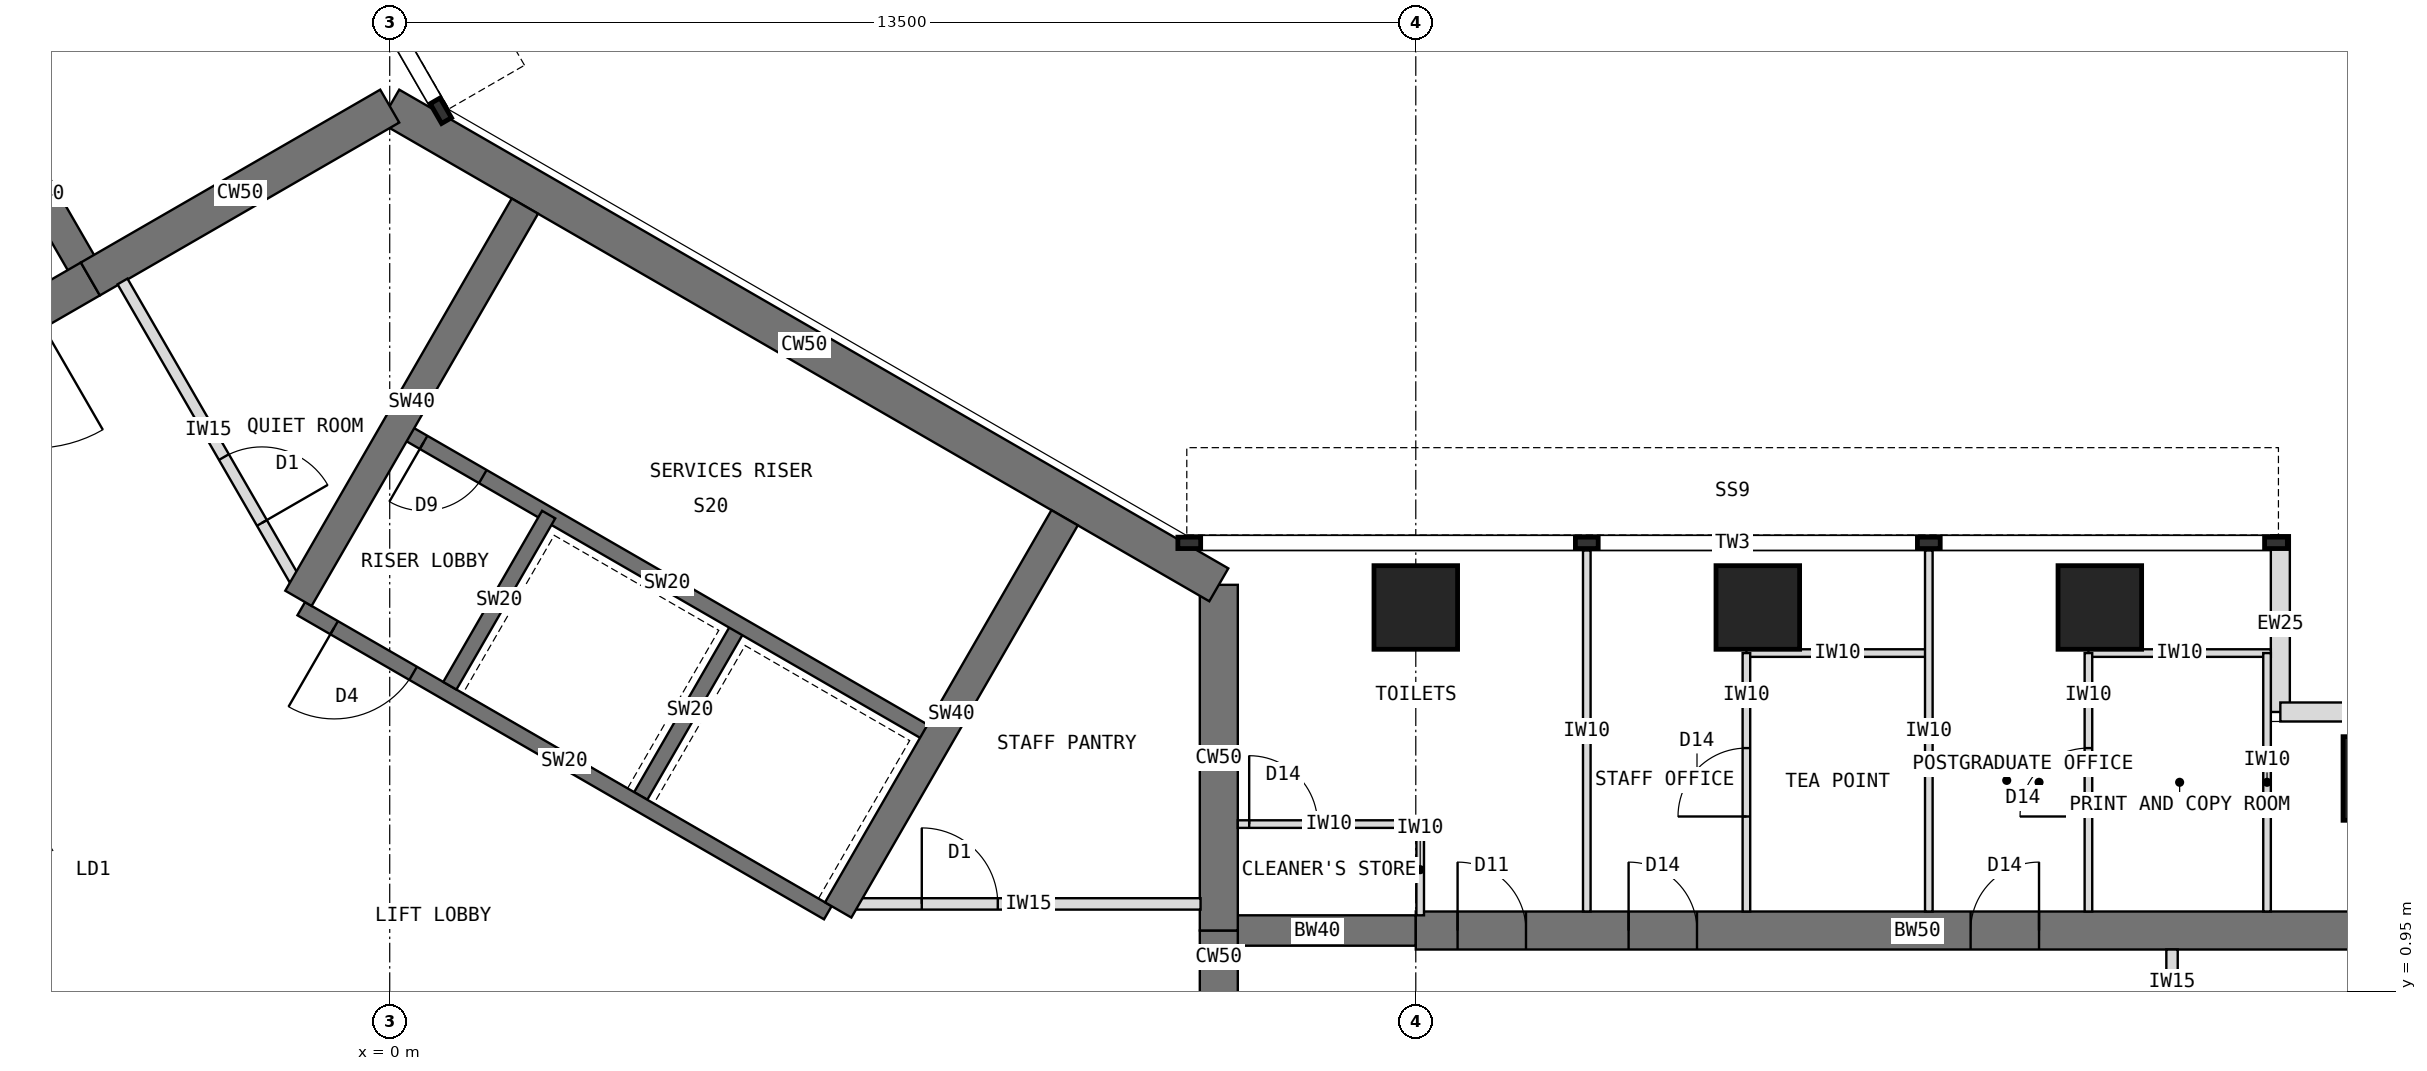
"""IFC4 building model, lengths in metres.
Left out: names, types, materials, properties, quantities, classifications, styles, units other than length and angle.
Written with IfcOpenShell. Run it as: python <this file> out.ifc"""

import sys

from ifc_helpers import new_model, si_unit, direction, frame, frame_2d, origin, origin_2d, place, context, subcontext, project, spatial, rectangle, extrude, element, fill, save


model = new_model("IFC4")
c1 = context("Model", 3, precision=1e-05, world=origin(), true_north=direction((0.0, 1.0)))
c2 = subcontext(c1, "Body", "Model", "MODEL_VIEW")
j1 = project(units=[si_unit("LENGTHUNIT", "METRE"), si_unit("PLANEANGLEUNIT", "RADIAN")], contexts=[c1])
p1 = place(None, origin())
s1 = spatial("IfcSite", under=j1, at=p1, CompositionType="ELEMENT")
p2 = place(p1, origin())
s2 = spatial("IfcBuilding", under=s1, at=p2, CompositionType="ELEMENT")
p3 = place(p2, frame((0.0, 0.0, 234.5)))
s3 = spatial("IfcBuildingStorey", under=s2, at=p3, CompositionType="ELEMENT", Elevation=234.5)
p4 = place(p3, frame((10.908, -1.75, 0.0), z_axis=(0.0, 0.0, 1.0), x_axis=(0.0, 1.0, 0.0)))
e1 = element("IfcWall", 1, at=p4, inside=s3, PredefinedType="SHEAR", context=c2, shape_type="SweptSolid", body=[
    extrude(rectangle(XDim=3.5, YDim=0.5, at=frame_2d((1.75, 0.0))), origin(), (0.0, 0.0, 1.0), 4.0),
])
p5 = place(p4, frame((0.85, 0.0, 0.0)))
e2 = element("IfcOpeningElement", 2, at=p5, cuts=e1, PredefinedType="OPENING", context=c2, shape_type="SweptSolid", body=[
    extrude(rectangle(XDim=1.8, YDim=2.1, at=frame_2d((0.9, 1.05))), frame((0.0, 0.26, 0.0), z_axis=(0.0, -1.0, 0.0), x_axis=(1.0, 0.0, 0.0)), (0.0, 0.0, 1.0), 0.52),
])
p6 = place(p3, frame((10.908, 1.75, 0.0), z_axis=(0.0, 0.0, 1.0), x_axis=(0.0, 1.0, 0.0)))
e3 = element("IfcWall", 3, at=p6, inside=s3, PredefinedType="SHEAR", context=c2, shape_type="SweptSolid", body=[
    extrude(rectangle(XDim=4.548, YDim=0.5, at=frame_2d((2.274, 0.0))), origin(), (0.0, 0.0, 1.0), 4.0),
])
p7 = place(p3, frame((10.908, 6.298, 0.0), z_axis=(0.0, 0.0, 1.0), x_axis=(-0.866021940709, 0.500005998175, 0.0)))
e4 = element("IfcWall", 4, at=p7, inside=s3, PredefinedType="SHEAR", context=c2, shape_type="SweptSolid", body=[
    extrude(rectangle(XDim=12.596, YDim=0.5, at=frame_2d((6.298, 0.0))), origin(), (0.0, 0.0, 1.0), 4.0),
])
p8 = place(p3, frame((0.0, 12.596, 0.0), z_axis=(0.0, 0.0, 1.0), x_axis=(-0.866011268655, -0.500024481964, 0.0)))
e5 = element("IfcWall", 5, at=p8, inside=s3, PredefinedType="SHEAR", context=c2, shape_type="SweptSolid", body=[
    extrude(rectangle(XDim=4.548, YDim=0.5, at=frame_2d((2.274, 0.0))), origin(), (0.0, 0.0, 1.0), 4.0),
])
p9 = place(p3, frame((-3.939, 10.322, 0.0), z_axis=(0.0, 0.0, 1.0), x_axis=(-0.866019471182, -0.500010275428, 0.0)))
e6 = element("IfcWall", 6, at=p9, inside=s3, PredefinedType="SHEAR", context=c2, shape_type="SweptSolid", body=[
    extrude(rectangle(XDim=3.5, YDim=0.5, at=frame_2d((1.75, 0.0))), origin(), (0.0, 0.0, 1.0), 4.0),
])
p10 = place(p9, frame((0.85, 0.0, 0.0)))
e7 = element("IfcOpeningElement", 7, at=p10, cuts=e6, PredefinedType="OPENING", context=c2, shape_type="SweptSolid", body=[
    extrude(rectangle(XDim=1.8, YDim=2.1, at=frame_2d((0.9, 1.05))), frame((0.0, 0.26, 0.0), z_axis=(0.0, -1.0, 0.0), x_axis=(1.0, 0.0, 0.0)), (0.0, 0.0, 1.0), 0.52),
])
p11 = place(p3, frame((10.908, 1.75, 0.0), z_axis=(0.0, 0.0, 1.0), x_axis=(1.0, 0.0, 0.0)))
e8 = element("IfcWall", 8, at=p11, inside=s3, PredefinedType="SHEAR", context=c2, shape_type="SweptSolid", body=[
    extrude(rectangle(XDim=2.592, YDim=0.4, at=frame_2d((1.296, 0.0))), origin(), (0.0, 0.0, 1.0), 4.0),
])
p12 = place(p3, frame((13.5, 1.75, 0.0), z_axis=(0.0, 0.0, 1.0), x_axis=(1.0, 0.0, 0.0)))
e9 = element("IfcWall", 9, at=p12, inside=s3, PredefinedType="SHEAR", context=c2, shape_type="SweptSolid", body=[
    extrude(rectangle(XDim=13.2, YDim=0.5, at=frame_2d((6.6, 0.0))), origin(), (0.0, 0.0, 1.0), 4.0),
])
p13 = place(p12, frame((0.55, 0.0, 0.0)))
e10 = element("IfcOpeningElement", 10, at=p13, cuts=e9, PredefinedType="OPENING", context=c2, shape_type="SweptSolid", body=[
    extrude(rectangle(XDim=0.9, YDim=2.1, at=frame_2d((0.45, 1.05))), frame((0.0, 0.26, 0.0), z_axis=(0.0, -1.0, 0.0), x_axis=(1.0, 0.0, 0.0)), (0.0, 0.0, 1.0), 0.52),
])
p14 = place(p12, frame((2.8, 0.0, 0.0)))
e11 = element("IfcOpeningElement", 11, at=p14, cuts=e9, PredefinedType="OPENING", context=c2, shape_type="SweptSolid", body=[
    extrude(rectangle(XDim=0.9, YDim=2.1, at=frame_2d((0.45, 1.05))), frame((0.0, 0.26, 0.0), z_axis=(0.0, -1.0, 0.0), x_axis=(1.0, 0.0, 0.0)), (0.0, 0.0, 1.0), 0.52),
])
p15 = place(p12, frame((7.3, 0.0, 0.0)))
e12 = element("IfcOpeningElement", 12, at=p15, cuts=e9, PredefinedType="OPENING", context=c2, shape_type="SweptSolid", body=[
    extrude(rectangle(XDim=0.9, YDim=2.1, at=frame_2d((0.45, 1.05))), frame((0.0, 0.26, 0.0), z_axis=(0.0, -1.0, 0.0), x_axis=(1.0, 0.0, 0.0)), (0.0, 0.0, 1.0), 0.52),
])
p16 = place(p3, frame((-3.939, 10.322, 0.0), z_axis=(0.0, 0.0, 1.0), x_axis=(-0.499918158782, 0.866072649678, 0.0)))
e13 = element("IfcWall", 13, at=p16, inside=s3, PredefinedType="SHEAR", context=c2, shape_type="SweptSolid", body=[
    extrude(rectangle(XDim=2.592, YDim=0.4, at=frame_2d((1.296, 0.0))), origin(), (0.0, 0.0, 1.0), 4.0),
])
for number, where, z_axis, x_axis in (
    (14, (13.5, 6.0, 0.0), (0.0, 0.0, 1.0), (1.0, 0.0, 0.0)),
    (15, (18.0, 6.0, 0.0), (0.0, 0.0, 1.0), (1.0, 0.0, 0.0)),
    (16, (22.5, 6.0, 0.0), (0.0, 0.0, 1.0), (1.0, 0.0, 0.0)),
    (17, (26.25, 3.75, 0.0), (0.0, 0.0, 1.0), (1.0, 0.0, 0.0)),
):
    element("IfcColumn", number, at=place(p3, frame(where, z_axis=z_axis, x_axis=x_axis)), inside=s3, PredefinedType="COLUMN", context=c2, shape_type="SweptSolid", body=[
        extrude(rectangle(XDim=1.1, YDim=1.1, at=origin_2d()), origin(), (0.0, 0.0, 1.0), 4.0),
    ])
for number, where, z_axis, x_axis in (
    (18, (24.875, 6.95, 0.0), (0.0, 0.0, 1.0), (0.0, -1.0, 0.0)),
    (19, (24.875, 4.625, 0.0), (0.0, 0.0, 1.0), (1.0, 0.0, 0.0)),
):
    element("IfcWall", number, at=place(p3, frame(where, z_axis=z_axis, x_axis=x_axis)), inside=s3, PredefinedType="STANDARD", context=c2, shape_type="SweptSolid", body=[
        extrude(rectangle(XDim=2.325, YDim=0.25, at=frame_2d((1.163, 0.0))), origin(), (0.0, 0.0, 1.0), 3.7),
    ])
p17 = place(p3, frame((5.764, 1.984, 0.0), z_axis=(0.0, 0.0, 1.0), x_axis=(-0.866026010844, 0.49999894854, 0.0)))
e20 = element("IfcWall", 20, at=p17, inside=s3, PredefinedType="SHEAR", context=c2, shape_type="SweptSolid", body=[
    extrude(rectangle(XDim=8.0, YDim=0.2, at=frame_2d((4.0, 0.0))), origin(), (0.0, 0.0, 1.0), 4.0),
])
p18 = place(p17, frame((6.3, 0.0, 0.0)))
e21 = element("IfcOpeningElement", 21, at=p18, cuts=e20, PredefinedType="OPENING", context=c2, shape_type="SweptSolid", body=[
    extrude(rectangle(XDim=1.2, YDim=2.1, at=frame_2d((0.6, 1.05))), frame((0.0, 0.11, 0.0), z_axis=(0.0, -1.0, 0.0), x_axis=(1.0, 0.0, 0.0)), (0.0, 0.0, 1.0), 0.22),
])
for number, where, z_axis, x_axis in (
    (22, (3.303, 3.52, 0.0), (0.0, 0.0, 1.0), (0.5, 0.866, 0.0)),
    (23, (0.791, 4.97, 0.0), (0.0, 0.0, 1.0), (0.5, 0.866, 0.0)),
):
    element("IfcWall", number, at=place(p3, frame(where, z_axis=z_axis, x_axis=x_axis)), inside=s3, PredefinedType="SHEAR", context=c2, shape_type="SweptSolid", body=[
        extrude(rectangle(XDim=2.6, YDim=0.2, at=frame_2d((1.3, 0.0))), origin(), (0.0, 0.0, 1.0), 4.0),
    ])
p19 = place(p3, frame((7.114, 4.322, 0.0), z_axis=(0.0, 0.0, 1.0), x_axis=(-0.866026010844, 0.49999894854, 0.0)))
e24 = element("IfcWall", 24, at=p19, inside=s3, PredefinedType="SHEAR", context=c2, shape_type="SweptSolid", body=[
    extrude(rectangle(XDim=8.0, YDim=0.2, at=frame_2d((4.0, 0.0))), origin(), (0.0, 0.0, 1.0), 4.0),
])
p20 = place(p19, frame((6.8, 0.0, 0.0)))
e25 = element("IfcOpeningElement", 25, at=p20, cuts=e24, PredefinedType="OPENING", context=c2, shape_type="SweptSolid", body=[
    extrude(rectangle(XDim=0.9, YDim=2.1, at=frame_2d((0.45, 1.05))), frame((0.0, 0.11, 0.0), z_axis=(0.0, -1.0, 0.0), x_axis=(1.0, 0.0, 0.0)), (0.0, 0.0, 1.0), 0.22),
])
p21 = place(p3, frame((-1.201, 6.12, 0.0), z_axis=(0.0, 0.0, 1.0), x_axis=(0.500021575205, 0.866012946976, 0.0)))
e26 = element("IfcWall", 26, at=p21, inside=s3, PredefinedType="SHEAR", context=c2, shape_type="SweptSolid", body=[
    extrude(rectangle(XDim=5.958, YDim=0.4, at=frame_2d((2.979, 0.0))), origin(), (0.0, 0.0, 1.0), 4.0),
])
p22 = place(p3, frame((5.901, 2.02, 0.0), z_axis=(0.0, 0.0, 1.0), x_axis=(0.500003832394, 0.86602319114, 0.0)))
e27 = element("IfcWall", 27, at=p22, inside=s3, PredefinedType="SHEAR", context=c2, shape_type="SweptSolid", body=[
    extrude(rectangle(XDim=5.958, YDim=0.4, at=frame_2d((2.979, 0.0))), origin(), (0.0, 0.0, 1.0), 4.0),
])
for number, where, z_axis, x_axis in (
    (28, (15.75, 2.0, 0.0), (0.0, 0.0, 1.0), (0.0, 1.0, 0.0)),
    (29, (20.25, 2.0, 0.0), (0.0, 0.0, 1.0), (0.0, 1.0, 0.0)),
):
    element("IfcWall", number, at=place(p3, frame(where, z_axis=z_axis, x_axis=x_axis)), inside=s3, PredefinedType="PARTITIONING", context=c2, shape_type="SweptSolid", body=[
        extrude(rectangle(XDim=4.75, YDim=0.1, at=frame_2d((2.375, 0.0))), origin(), (0.0, 0.0, 1.0), 3.7),
    ])
p23 = place(p3, frame((17.85, 5.4, 0.0), z_axis=(0.0, 0.0, 1.0), x_axis=(1.0, 0.0, 0.0)))
e30 = element("IfcWall", 30, at=p23, inside=s3, PredefinedType="PARTITIONING", context=c2, shape_type="SweptSolid", body=[
    extrude(rectangle(XDim=2.4, YDim=0.1, at=frame_2d((1.2, 0.0))), origin(), (0.0, 0.0, 1.0), 3.7),
])
p24 = place(p3, frame((17.85, 2.0, 0.0), z_axis=(0.0, 0.0, 1.0), x_axis=(0.0, 1.0, 0.0)))
e31 = element("IfcWall", 31, at=p24, inside=s3, PredefinedType="PARTITIONING", context=c2, shape_type="SweptSolid", body=[
    extrude(rectangle(XDim=3.4, YDim=0.1, at=frame_2d((1.7, 0.0))), origin(), (0.0, 0.0, 1.0), 3.7),
])
p25 = place(p24, frame((1.25, 0.0, 0.0)))
e32 = element("IfcOpeningElement", 32, at=p25, cuts=e31, PredefinedType="OPENING", context=c2, shape_type="SweptSolid", body=[
    extrude(rectangle(XDim=0.9, YDim=2.1, at=frame_2d((0.45, 1.05))), frame((0.0, 0.06, 0.0), z_axis=(0.0, -1.0, 0.0), x_axis=(1.0, 0.0, 0.0)), (0.0, 0.0, 1.0), 0.12),
])
p26 = place(p3, frame((22.35, 5.4, 0.0), z_axis=(0.0, 0.0, 1.0), x_axis=(1.0, 0.0, 0.0)))
e33 = element("IfcWall", 33, at=p26, inside=s3, PredefinedType="PARTITIONING", context=c2, shape_type="SweptSolid", body=[
    extrude(rectangle(XDim=2.4, YDim=0.1, at=frame_2d((1.2, 0.0))), origin(), (0.0, 0.0, 1.0), 3.7),
])
p27 = place(p3, frame((22.35, 2.0, 0.0), z_axis=(0.0, 0.0, 1.0), x_axis=(0.0, 1.0, 0.0)))
e34 = element("IfcWall", 34, at=p27, inside=s3, PredefinedType="PARTITIONING", context=c2, shape_type="SweptSolid", body=[
    extrude(rectangle(XDim=3.4, YDim=0.1, at=frame_2d((1.7, 0.0))), origin(), (0.0, 0.0, 1.0), 3.7),
])
p28 = place(p27, frame((1.25, 0.0, 0.0)))
e35 = element("IfcOpeningElement", 35, at=p28, cuts=e34, PredefinedType="OPENING", context=c2, shape_type="SweptSolid", body=[
    extrude(rectangle(XDim=0.9, YDim=2.1, at=frame_2d((0.45, 1.05))), frame((0.0, 0.06, 0.0), z_axis=(0.0, -1.0, 0.0), x_axis=(1.0, 0.0, 0.0)), (0.0, 0.0, 1.0), 0.12),
])
p29 = place(p3, frame((24.7, 2.0, 0.0), z_axis=(0.0, 0.0, 1.0), x_axis=(0.0, 1.0, 0.0)))
e36 = element("IfcWall", 36, at=p29, inside=s3, PredefinedType="PARTITIONING", context=c2, shape_type="SweptSolid", body=[
    extrude(rectangle(XDim=3.4, YDim=0.1, at=frame_2d((1.7, 0.0))), origin(), (0.0, 0.0, 1.0), 3.7),
])
p30 = place(p3, frame((11.158, 3.15, 0.0), z_axis=(0.0, 0.0, 1.0), x_axis=(1.0, 0.0, 0.0)))
e37 = element("IfcWall", 37, at=p30, inside=s3, PredefinedType="PARTITIONING", context=c2, shape_type="SweptSolid", body=[
    extrude(rectangle(XDim=2.4, YDim=0.1, at=frame_2d((1.2, 0.0))), origin(), (0.0, 0.0, 1.0), 3.7),
])
p31 = place(p30, frame((0.15, 0.0, 0.0)))
e38 = element("IfcOpeningElement", 38, at=p31, cuts=e37, PredefinedType="OPENING", context=c2, shape_type="SweptSolid", body=[
    extrude(rectangle(XDim=0.9, YDim=2.1, at=frame_2d((0.45, 1.05))), frame((0.0, 0.06, 0.0), z_axis=(0.0, -1.0, 0.0), x_axis=(1.0, 0.0, 0.0)), (0.0, 0.0, 1.0), 0.12),
])
p32 = place(p3, frame((13.558, 1.95, 0.0), z_axis=(0.0, 0.0, 1.0), x_axis=(0.0, 1.0, 0.0)))
e39 = element("IfcWall", 39, at=p32, inside=s3, PredefinedType="PARTITIONING", context=c2, shape_type="SweptSolid", body=[
    extrude(rectangle(XDim=1.2, YDim=0.1, at=frame_2d((0.6, 0.0))), origin(), (0.0, 0.0, 1.0), 3.167),
])
p33 = place(p3, frame((-3.515, 10.289, 0.0), z_axis=(0.0, 0.0, 1.0), x_axis=(0.499968392031, -0.866043651885, 0.0)))
e40 = element("IfcWall", 40, at=p33, inside=s3, PredefinedType="PARTITIONING", context=c2, shape_type="SweptSolid", body=[
    extrude(rectangle(XDim=4.526, YDim=0.15, at=frame_2d((2.263, 0.0))), origin(), (0.0, 0.0, 1.0), 3.7),
])
p34 = place(p33, frame((2.668, 0.0, 0.0)))
e41 = element("IfcOpeningElement", 41, at=p34, cuts=e40, PredefinedType="OPENING", context=c2, shape_type="SweptSolid", body=[
    extrude(rectangle(XDim=1.0, YDim=2.1, at=frame_2d((0.5, 1.05))), frame((0.0, 0.085, 0.0), z_axis=(0.0, -1.0, 0.0), x_axis=(1.0, 0.0, 0.0)), (0.0, 0.0, 1.0), 0.17),
])
p35 = place(p3, frame((6.143, 2.1, 0.0), z_axis=(0.0, 0.0, 1.0), x_axis=(1.0, 0.0, 0.0)))
e42 = element("IfcWall", 42, at=p35, inside=s3, PredefinedType="PARTITIONING", context=c2, shape_type="SweptSolid", body=[
    extrude(rectangle(XDim=4.526, YDim=0.15, at=frame_2d((2.263, 0.0))), origin(), (0.0, 0.0, 1.0), 3.7),
])
p36 = place(p35, frame((0.858, 0.0, 0.0)))
e43 = element("IfcOpeningElement", 43, at=p36, cuts=e42, PredefinedType="OPENING", context=c2, shape_type="SweptSolid", body=[
    extrude(rectangle(XDim=1.0, YDim=2.1, at=frame_2d((0.5, 1.05))), frame((0.0, 0.085, 0.0), z_axis=(0.0, -1.0, 0.0), x_axis=(1.0, 0.0, 0.0)), (0.0, 0.0, 1.0), 0.17),
])
p37 = place(p3, frame((23.45, -1.5, 0.0), z_axis=(0.0, 0.0, 1.0), x_axis=(0.0, 1.0, 0.0)))
e44 = element("IfcWall", 44, at=p37, inside=s3, PredefinedType="PARTITIONING", context=c2, shape_type="SweptSolid", body=[
    extrude(rectangle(XDim=3.0, YDim=0.15, at=frame_2d((1.5, 0.0))), origin(), (0.0, 0.0, 1.0), 3.7),
])
p38 = place(p37, frame((1.0, 0.0, 0.0)))
e45 = element("IfcOpeningElement", 45, at=p38, cuts=e44, PredefinedType="OPENING", context=c2, shape_type="SweptSolid", body=[
    extrude(rectangle(XDim=1.0, YDim=2.1, at=frame_2d((0.5, 1.05))), frame((0.0, 0.085, 0.0), z_axis=(0.0, -1.0, 0.0), x_axis=(1.0, 0.0, 0.0)), (0.0, 0.0, 1.0), 0.17),
])
p39 = place(p18, origin())
e46 = element("IfcDoor", 46, at=p39, inside=s3, OperationType="SINGLE_SWING_RIGHT", PredefinedType="DOOR", context=c2, shape_type="SweptSolid", body=[
    extrude(rectangle(XDim=1.2, YDim=2.1, at=frame_2d((0.6, 1.05))), frame((0.0, 0.025, 0.0), z_axis=(0.0, -1.0, 0.0), x_axis=(1.0, 0.0, 0.0)), (0.0, 0.0, 1.0), 0.05),
])
fill(e21, e46)
p40 = place(p20, origin())
e47 = element("IfcDoor", 47, at=p40, inside=s3, OperationType="SINGLE_SWING_RIGHT", PredefinedType="DOOR", context=c2, shape_type="SweptSolid", body=[
    extrude(rectangle(XDim=0.9, YDim=2.1, at=frame_2d((0.45, 1.05))), frame((0.0, 0.025, 0.0), z_axis=(0.0, -1.0, 0.0), x_axis=(1.0, 0.0, 0.0)), (0.0, 0.0, 1.0), 0.05),
])
fill(e25, e47)
p41 = place(p25, origin())
e48 = element("IfcDoor", 48, at=p41, inside=s3, OperationType="SINGLE_SWING_LEFT", PredefinedType="DOOR", context=c2, shape_type="SweptSolid", body=[
    extrude(rectangle(XDim=0.9, YDim=2.1, at=frame_2d((0.45, 1.05))), frame((0.0, 0.025, 0.0), z_axis=(0.0, -1.0, 0.0), x_axis=(1.0, 0.0, 0.0)), (0.0, 0.0, 1.0), 0.05),
])
fill(e32, e48)
p42 = place(p28, origin())
e49 = element("IfcDoor", 49, at=p42, inside=s3, OperationType="SINGLE_SWING_LEFT", PredefinedType="DOOR", context=c2, shape_type="SweptSolid", body=[
    extrude(rectangle(XDim=0.9, YDim=2.1, at=frame_2d((0.45, 1.05))), frame((0.0, 0.025, 0.0), z_axis=(0.0, -1.0, 0.0), x_axis=(1.0, 0.0, 0.0)), (0.0, 0.0, 1.0), 0.05),
])
fill(e35, e49)
p43 = place(p31, origin())
e50 = element("IfcDoor", 50, at=p43, inside=s3, OperationType="SINGLE_SWING_LEFT", PredefinedType="DOOR", context=c2, shape_type="SweptSolid", body=[
    extrude(rectangle(XDim=0.9, YDim=2.1, at=frame_2d((0.45, 1.05))), frame((0.0, 0.025, 0.0), z_axis=(0.0, -1.0, 0.0), x_axis=(1.0, 0.0, 0.0)), (0.0, 0.0, 1.0), 0.05),
])
fill(e38, e50)
p44 = place(p36, origin())
e51 = element("IfcDoor", 51, at=p44, inside=s3, OperationType="SINGLE_SWING_LEFT", PredefinedType="DOOR", context=c2, shape_type="SweptSolid", body=[
    extrude(rectangle(XDim=1.0, YDim=2.1, at=frame_2d((0.5, 1.05))), frame((0.0, 0.025, 0.0), z_axis=(0.0, -1.0, 0.0), x_axis=(1.0, 0.0, 0.0)), (0.0, 0.0, 1.0), 0.05),
])
fill(e43, e51)
p45 = place(p34, origin())
e52 = element("IfcDoor", 52, at=p45, inside=s3, OperationType="SINGLE_SWING_RIGHT", PredefinedType="DOOR", context=c2, shape_type="SweptSolid", body=[
    extrude(rectangle(XDim=1.0, YDim=2.1, at=frame_2d((0.5, 1.05))), frame((0.0, 0.025, 0.0), z_axis=(0.0, -1.0, 0.0), x_axis=(1.0, 0.0, 0.0)), (0.0, 0.0, 1.0), 0.05),
])
fill(e41, e52)
p46 = place(p13, origin())
e53 = element("IfcDoor", 53, at=p46, inside=s3, OperationType="SINGLE_SWING_LEFT", PredefinedType="DOOR", context=c2, shape_type="SweptSolid", body=[
    extrude(rectangle(XDim=0.9, YDim=2.1, at=frame_2d((0.45, 1.05))), frame((0.0, 0.025, 0.0), z_axis=(0.0, -1.0, 0.0), x_axis=(1.0, 0.0, 0.0)), (0.0, 0.0, 1.0), 0.05),
])
fill(e10, e53)
p47 = place(p14, origin())
e54 = element("IfcDoor", 54, at=p47, inside=s3, OperationType="SINGLE_SWING_LEFT", PredefinedType="DOOR", context=c2, shape_type="SweptSolid", body=[
    extrude(rectangle(XDim=0.9, YDim=2.1, at=frame_2d((0.45, 1.05))), frame((0.0, 0.025, 0.0), z_axis=(0.0, -1.0, 0.0), x_axis=(1.0, 0.0, 0.0)), (0.0, 0.0, 1.0), 0.05),
])
fill(e11, e54)
p48 = place(p15, origin())
e55 = element("IfcDoor", 55, at=p48, inside=s3, OperationType="SINGLE_SWING_RIGHT", PredefinedType="DOOR", context=c2, shape_type="SweptSolid", body=[
    extrude(rectangle(XDim=0.9, YDim=2.1, at=frame_2d((0.45, 1.05))), frame((0.0, 0.025, 0.0), z_axis=(0.0, -1.0, 0.0), x_axis=(1.0, 0.0, 0.0)), (0.0, 0.0, 1.0), 0.05),
])
fill(e12, e55)
save(model, sys.argv[1])
